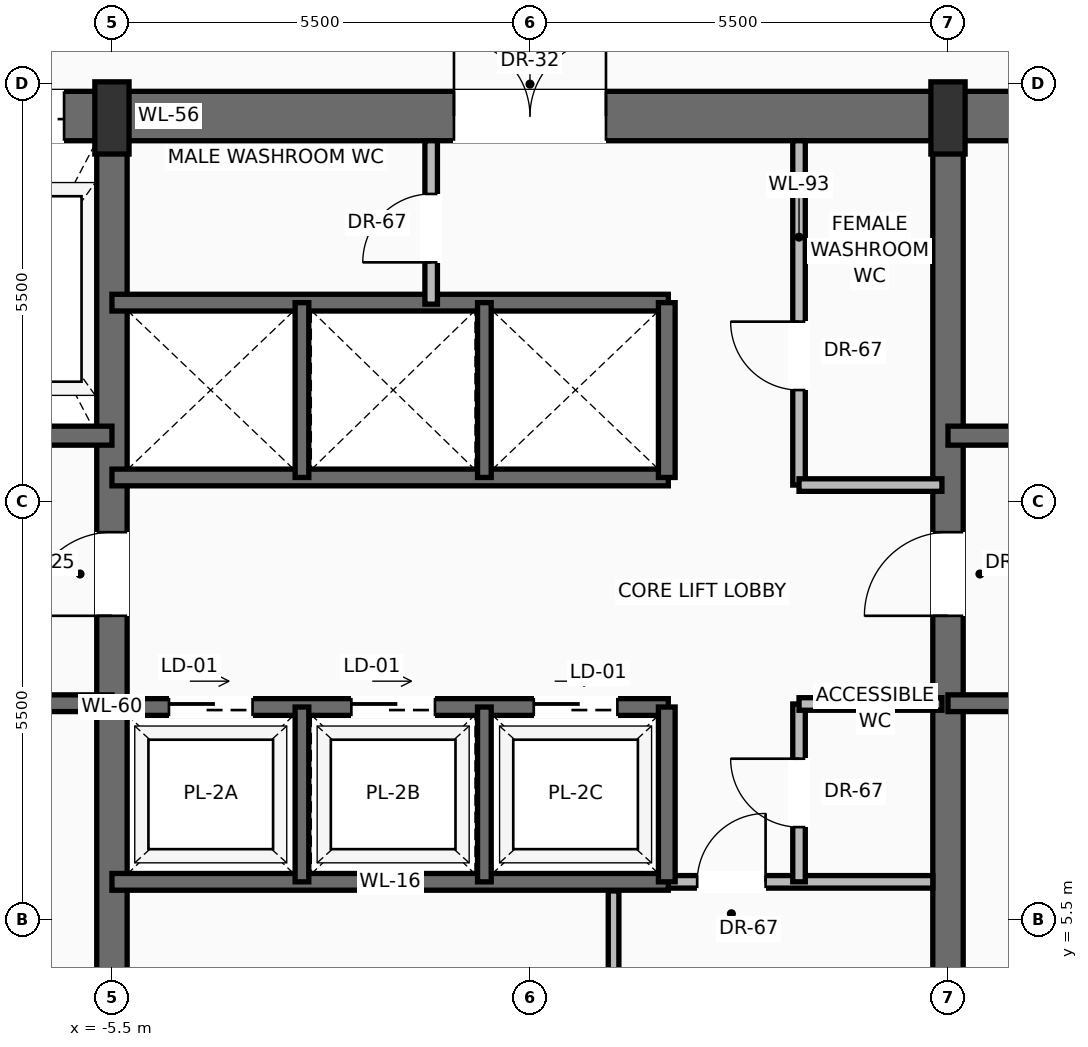
"""IFC4 building model, lengths in metres.
Left out: names, types, materials, properties, quantities, classifications, styles, units other than length and angle.
Written with IfcOpenShell. Run it as: python <this file> out.ifc"""

import sys

from ifc_helpers import new_model, si_unit, direction, frame, frame_2d, origin, origin_2d, place, context, subcontext, project, spatial, rectangle, extrude, source, transform, mapped, element, fill, save


model = new_model("IFC4")
c1 = context("Model", 3, precision=1e-05, world=origin(), true_north=direction((0.0, 1.0)))
c2 = subcontext(c1, "Body", "Model", "MODEL_VIEW")
j1 = project(units=[si_unit("LENGTHUNIT", "METRE"), si_unit("PLANEANGLEUNIT", "RADIAN")], contexts=[c1])
p1 = place(None, origin())
s1 = spatial("IfcSite", under=j1, at=p1, CompositionType="ELEMENT")
p2 = place(p1, origin())
s2 = spatial("IfcBuilding", under=s1, at=p2, CompositionType="ELEMENT")
p3 = place(p2, frame((0.0, 0.0, 147.8)))
s3 = spatial("IfcBuildingStorey", under=s2, at=p3, CompositionType="ELEMENT", Elevation=147.8)
p4 = place(p3, frame((-10.8, 16.075, 0.0), z_axis=(0.0, 0.0, 1.0), x_axis=(1.0, 0.0, 0.0)))
e1 = element("IfcWall", 1, at=p4, inside=s3, PredefinedType="SHEAR", context=c2, shape_type="SweptSolid", body=[
    extrude(rectangle(XDim=21.6, YDim=0.65, at=frame_2d((10.8, 0.0))), origin(), (0.0, 0.0, 1.0), 3.47),
])
p5 = place(p4, frame((3.37, 0.0, 0.0)))
e2 = element("IfcOpeningElement", 2, at=p5, cuts=e1, PredefinedType="OPENING", context=c2, shape_type="SweptSolid", body=[
    extrude(rectangle(XDim=1.3, YDim=2.3, at=frame_2d((0.65, 1.15))), frame((0.0, 0.335, 0.0), z_axis=(0.0, -1.0, 0.0), x_axis=(1.0, 0.0, 0.0)), (0.0, 0.0, 1.0), 0.67),
])
p6 = place(p4, frame((9.8, 0.0, 0.0)))
e3 = element("IfcOpeningElement", 3, at=p6, cuts=e1, PredefinedType="OPENING", context=c2, shape_type="SweptSolid", body=[
    extrude(rectangle(XDim=2.0, YDim=2.4, at=frame_2d((1.0, 1.2))), frame((0.0, 0.335, 0.0), z_axis=(0.0, -1.0, 0.0), x_axis=(1.0, 0.0, 0.0)), (0.0, 0.0, 1.0), 0.67),
])
p7 = place(p3, frame((-5.5, 0.525, 0.0), z_axis=(0.0, 0.0, 1.0), x_axis=(0.0, 1.0, 0.0)))
e4 = element("IfcWall", 4, at=p7, inside=s3, PredefinedType="SHEAR", context=c2, shape_type="SweptSolid", body=[
    extrude(rectangle(XDim=15.55, YDim=0.4, at=frame_2d((7.775, 0.0))), origin(), (0.0, 0.0, 1.0), 3.47),
])
p8 = place(p7, frame((8.975, 0.0, 0.0)))
e5 = element("IfcOpeningElement", 5, at=p8, cuts=e4, PredefinedType="OPENING", context=c2, shape_type="SweptSolid", body=[
    extrude(rectangle(XDim=1.1, YDim=2.2, at=frame_2d((0.55, 1.1))), frame((0.0, 0.21, 0.0), z_axis=(0.0, -1.0, 0.0), x_axis=(1.0, 0.0, 0.0)), (0.0, 0.0, 1.0), 0.42),
])
p9 = place(p3, frame((5.5, 0.525, 0.0), z_axis=(0.0, 0.0, 1.0), x_axis=(0.0, 1.0, 0.0)))
e6 = element("IfcWall", 6, at=p9, inside=s3, PredefinedType="SHEAR", context=c2, shape_type="SweptSolid", body=[
    extrude(rectangle(XDim=15.55, YDim=0.4, at=frame_2d((7.775, 0.0))), origin(), (0.0, 0.0, 1.0), 3.47),
])
p10 = place(p9, frame((8.975, 0.0, 0.0)))
e7 = element("IfcOpeningElement", 7, at=p10, cuts=e6, PredefinedType="OPENING", context=c2, shape_type="SweptSolid", body=[
    extrude(rectangle(XDim=1.1, YDim=2.2, at=frame_2d((0.55, 1.1))), frame((0.0, 0.21, 0.0), z_axis=(0.0, -1.0, 0.0), x_axis=(1.0, 0.0, 0.0)), (0.0, 0.0, 1.0), 0.42),
])
m1 = source(origin(), c2, "Body", "SweptSolid", [
    extrude(rectangle(XDim=0.45, YDim=0.95, at=origin_2d()), origin(), (0.0, 0.0, 1.0), 3.7),
])
for number, where, z_axis, x_axis in (
    (8, (-5.5, 16.05, 0.0), (0.0, 0.0, 1.0), (1.0, 0.0, 0.0)),
    (9, (5.5, 16.05, 0.0), (0.0, 0.0, 1.0), (1.0, 0.0, 0.0)),
):
    element("IfcColumn", number, at=place(p3, frame(where, z_axis=z_axis, x_axis=x_axis)), inside=s3, PredefinedType="PILASTER", context=c2, shape_type="MappedRepresentation", body=[
        mapped(m1, transform((0.0, 0.0, 0.0), scale=1.0)),
    ])
p11 = place(p3, frame((-5.5, 8.35, 0.0), z_axis=(0.0, 0.0, 1.0), x_axis=(-1.0, 0.0, 0.0)))
e10 = element("IfcWall", 10, at=p11, inside=s3, PredefinedType="SOLIDWALL", context=c2, shape_type="SweptSolid", body=[
    extrude(rectangle(XDim=4.65, YDim=0.22, at=frame_2d((2.325, 0.0))), origin(), (0.0, 0.0, 1.0), 3.47),
])
p12 = place(p11, frame((2.5, 0.0, 0.0)))
e11 = element("IfcOpeningElement", 11, at=p12, cuts=e10, PredefinedType="OPENING", context=c2, shape_type="SweptSolid", body=[
    extrude(rectangle(XDim=1.15, YDim=2.2, at=frame_2d((0.575, 1.1))), frame((0.0, 0.12, 0.0), z_axis=(0.0, -1.0, 0.0), x_axis=(1.0, 0.0, 0.0)), (0.0, 0.0, 1.0), 0.24),
])
p13 = place(p3, frame((-5.5, 11.87, 0.0), z_axis=(0.0, 0.0, 1.0), x_axis=(-1.0, 0.0, 0.0)))
e12 = element("IfcWall", 12, at=p13, inside=s3, PredefinedType="SOLIDWALL", context=c2, shape_type="SweptSolid", body=[
    extrude(rectangle(XDim=4.65, YDim=0.25, at=frame_2d((2.325, 0.0))), origin(), (0.0, 0.0, 1.0), 3.47),
])
p14 = place(p13, frame((2.95, 0.0, 0.0)))
e13 = element("IfcOpeningElement", 13, at=p14, cuts=e12, PredefinedType="OPENING", context=c2, shape_type="SweptSolid", body=[
    extrude(rectangle(XDim=1.2, YDim=2.25, at=frame_2d((0.6, 1.125))), frame((0.0, 0.135, 0.0), z_axis=(0.0, -1.0, 0.0), x_axis=(1.0, 0.0, 0.0)), (0.0, 0.0, 1.0), 0.27),
])
p15 = place(p3, frame((10.15, 8.35, 0.0), z_axis=(0.0, 0.0, 1.0), x_axis=(-1.0, 0.0, 0.0)))
e14 = element("IfcWall", 14, at=p15, inside=s3, PredefinedType="SOLIDWALL", context=c2, shape_type="SweptSolid", body=[
    extrude(rectangle(XDim=4.65, YDim=0.22, at=frame_2d((2.325, 0.0))), origin(), (0.0, 0.0, 1.0), 3.47),
])
p16 = place(p15, frame((1.0, 0.0, 0.0)))
e15 = element("IfcOpeningElement", 15, at=p16, cuts=e14, PredefinedType="OPENING", context=c2, shape_type="SweptSolid", body=[
    extrude(rectangle(XDim=1.15, YDim=2.2, at=frame_2d((0.575, 1.1))), frame((0.0, 0.12, 0.0), z_axis=(0.0, -1.0, 0.0), x_axis=(1.0, 0.0, 0.0)), (0.0, 0.0, 1.0), 0.24),
])
p17 = place(p3, frame((10.15, 11.87, 0.0), z_axis=(0.0, 0.0, 1.0), x_axis=(-1.0, 0.0, 0.0)))
e16 = element("IfcWall", 16, at=p17, inside=s3, PredefinedType="SOLIDWALL", context=c2, shape_type="SweptSolid", body=[
    extrude(rectangle(XDim=4.65, YDim=0.25, at=frame_2d((2.325, 0.0))), origin(), (0.0, 0.0, 1.0), 3.47),
])
p18 = place(p17, frame((0.5, 0.0, 0.0)))
e17 = element("IfcOpeningElement", 17, at=p18, cuts=e16, PredefinedType="OPENING", context=c2, shape_type="SweptSolid", body=[
    extrude(rectangle(XDim=1.2, YDim=2.25, at=frame_2d((0.6, 1.125))), frame((0.0, 0.135, 0.0), z_axis=(0.0, -1.0, 0.0), x_axis=(1.0, 0.0, 0.0)), (0.0, 0.0, 1.0), 0.27),
])
p19 = place(p3, frame((1.82, 6.0, 0.0), z_axis=(0.0, 0.0, 1.0), x_axis=(1.0, 0.0, 0.0)))
e18 = element("IfcWall", 18, at=p19, inside=s3, PredefinedType="PARTITIONING", context=c2, shape_type="SweptSolid", body=[
    extrude(rectangle(XDim=3.48, YDim=0.165, at=frame_2d((1.74, 0.0))), origin(), (0.0, 0.0, 1.0), 3.462),
])
p20 = place(p19, frame((0.38, 0.0, 0.0)))
e19 = element("IfcOpeningElement", 19, at=p20, cuts=e18, PredefinedType="OPENING", context=c2, shape_type="SweptSolid", body=[
    extrude(rectangle(XDim=0.9, YDim=2.1, at=frame_2d((0.45, 1.05))), frame((0.0, 0.093, 0.0), z_axis=(0.0, -1.0, 0.0), x_axis=(1.0, 0.0, 0.0)), (0.0, 0.0, 1.0), 0.185),
])
p21 = place(p3, frame((1.1, 0.85, 0.0), z_axis=(0.0, 0.0, 1.0), x_axis=(0.0, 1.0, 0.0)))
e20 = element("IfcWall", 20, at=p21, inside=s3, PredefinedType="PARTITIONING", context=c2, shape_type="SweptSolid", body=[
    extrude(rectangle(XDim=5.03, YDim=0.14, at=frame_2d((2.515, 0.0))), origin(), (0.0, 0.0, 1.0), 3.462),
])
p22 = place(p21, frame((2.1, 0.0, 0.0)))
e21 = element("IfcOpeningElement", 21, at=p22, cuts=e20, PredefinedType="OPENING", context=c2, shape_type="SweptSolid", body=[
    extrude(rectangle(XDim=0.9, YDim=2.1, at=frame_2d((0.45, 1.05))), frame((0.0, 0.08, 0.0), z_axis=(0.0, -1.0, 0.0), x_axis=(1.0, 0.0, 0.0)), (0.0, 0.0, 1.0), 0.16),
])
p23 = place(p3, frame((3.54, 6.0, 0.0), z_axis=(0.0, 0.0, 1.0), x_axis=(0.0, 1.0, 0.0)))
e22 = element("IfcWall", 22, at=p23, inside=s3, PredefinedType="PARTITIONING", context=c2, shape_type="SweptSolid", body=[
    extrude(rectangle(XDim=2.34, YDim=0.165, at=frame_2d((1.17, 0.0))), origin(), (0.0, 0.0, 1.0), 3.462),
])
p24 = place(p23, frame((0.72, 0.0, 0.0)))
e23 = element("IfcOpeningElement", 23, at=p24, cuts=e22, PredefinedType="OPENING", context=c2, shape_type="SweptSolid", body=[
    extrude(rectangle(XDim=0.9, YDim=2.1, at=frame_2d((0.45, 1.05))), frame((0.0, 0.093, 0.0), z_axis=(0.0, -1.0, 0.0), x_axis=(1.0, 0.0, 0.0)), (0.0, 0.0, 1.0), 0.185),
])
p25 = place(p3, frame((3.54, 8.34, 0.0), z_axis=(0.0, 0.0, 1.0), x_axis=(1.0, 0.0, 0.0)))
e24 = element("IfcWall", 24, at=p25, inside=s3, PredefinedType="PARTITIONING", context=c2, shape_type="SweptSolid", body=[
    extrude(rectangle(XDim=1.88, YDim=0.165, at=frame_2d((0.94, 0.0))), origin(), (0.0, 0.0, 1.0), 3.462),
])
p26 = place(p3, frame((-5.5, 6.0, 0.0), z_axis=(0.0, 0.0, 1.0), x_axis=(1.0, 0.0, 0.0)))
e25 = element("IfcWall", 25, at=p26, inside=s3, PredefinedType="SOLIDWALL", context=c2, shape_type="SweptSolid", body=[
    extrude(rectangle(XDim=7.32, YDim=0.22, at=frame_2d((3.66, 0.0))), origin(), (0.0, 0.0, 1.0), 3.47),
])
p27 = place(p3, frame((-5.5, 8.3, 0.0), z_axis=(0.0, 0.0, 1.0), x_axis=(1.0, 0.0, 0.0)))
e26 = element("IfcWall", 26, at=p27, inside=s3, PredefinedType="SOLIDWALL", context=c2, shape_type="SweptSolid", body=[
    extrude(rectangle(XDim=7.32, YDim=0.22, at=frame_2d((3.66, 0.0))), origin(), (0.0, 0.0, 1.0), 3.47),
])
p28 = place(p27, frame((0.75, 0.0, 0.0)))
e27 = element("IfcOpeningElement", 27, at=p28, cuts=e26, PredefinedType="OPENING", context=c2, shape_type="SweptSolid", body=[
    extrude(rectangle(XDim=1.1, YDim=2.2, at=frame_2d((0.55, 1.1))), frame((0.0, 0.12, 0.0), z_axis=(0.0, -1.0, 0.0), x_axis=(1.0, 0.0, 0.0)), (0.0, 0.0, 1.0), 0.24),
])
p29 = place(p27, frame((3.15, 0.0, 0.0)))
e28 = element("IfcOpeningElement", 28, at=p29, cuts=e26, PredefinedType="OPENING", context=c2, shape_type="SweptSolid", body=[
    extrude(rectangle(XDim=1.1, YDim=2.2, at=frame_2d((0.55, 1.1))), frame((0.0, 0.12, 0.0), z_axis=(0.0, -1.0, 0.0), x_axis=(1.0, 0.0, 0.0)), (0.0, 0.0, 1.0), 0.24),
])
p30 = place(p27, frame((5.55, 0.0, 0.0)))
e29 = element("IfcOpeningElement", 29, at=p30, cuts=e26, PredefinedType="OPENING", context=c2, shape_type="SweptSolid", body=[
    extrude(rectangle(XDim=1.1, YDim=2.2, at=frame_2d((0.55, 1.1))), frame((0.0, 0.12, 0.0), z_axis=(0.0, -1.0, 0.0), x_axis=(1.0, 0.0, 0.0)), (0.0, 0.0, 1.0), 0.24),
])
p31 = place(p3, frame((1.8, 6.0, 0.0), z_axis=(0.0, 0.0, 1.0), x_axis=(0.0, 1.0, 0.0)))
e30 = element("IfcWall", 30, at=p31, inside=s3, PredefinedType="SOLIDWALL", context=c2, shape_type="SweptSolid", body=[
    extrude(rectangle(XDim=2.3, YDim=0.22, at=frame_2d((1.15, 0.0))), origin(), (0.0, 0.0, 1.0), 3.47),
])
for number, where, z_axis, x_axis in (
    (31, (-3.0, 6.0, 0.0), (0.0, 0.0, 1.0), (0.0, 1.0, 0.0)),
    (32, (-0.6, 6.0, 0.0), (0.0, 0.0, 1.0), (0.0, 1.0, 0.0)),
):
    element("IfcWall", number, at=place(p3, frame(where, z_axis=z_axis, x_axis=x_axis)), inside=s3, PredefinedType="SOLIDWALL", context=c2, shape_type="SweptSolid", body=[
        extrude(rectangle(XDim=2.3, YDim=0.18, at=frame_2d((1.15, 0.0))), origin(), (0.0, 0.0, 1.0), 3.47),
    ])
for number, where, z_axis, x_axis in (
    (33, (-5.5, 11.32, 0.0), (0.0, 0.0, 1.0), (1.0, 0.0, 0.0)),
    (34, (-5.5, 13.62, 0.0), (0.0, 0.0, 1.0), (1.0, 0.0, 0.0)),
):
    element("IfcWall", number, at=place(p3, frame(where, z_axis=z_axis, x_axis=x_axis)), inside=s3, PredefinedType="SOLIDWALL", context=c2, shape_type="SweptSolid", body=[
        extrude(rectangle(XDim=7.32, YDim=0.22, at=frame_2d((3.66, 0.0))), origin(), (0.0, 0.0, 1.0), 3.47),
    ])
p32 = place(p3, frame((1.8, 11.32, 0.0), z_axis=(0.0, 0.0, 1.0), x_axis=(0.0, 1.0, 0.0)))
e35 = element("IfcWall", 35, at=p32, inside=s3, PredefinedType="SOLIDWALL", context=c2, shape_type="SweptSolid", body=[
    extrude(rectangle(XDim=2.3, YDim=0.22, at=frame_2d((1.15, 0.0))), origin(), (0.0, 0.0, 1.0), 3.47),
])
for number, where, z_axis, x_axis in (
    (36, (-3.0, 11.32, 0.0), (0.0, 0.0, 1.0), (0.0, 1.0, 0.0)),
    (37, (-0.6, 11.32, 0.0), (0.0, 0.0, 1.0), (0.0, 1.0, 0.0)),
):
    element("IfcWall", number, at=place(p3, frame(where, z_axis=z_axis, x_axis=x_axis)), inside=s3, PredefinedType="SOLIDWALL", context=c2, shape_type="SweptSolid", body=[
        extrude(rectangle(XDim=2.3, YDim=0.18, at=frame_2d((1.15, 0.0))), origin(), (0.0, 0.0, 1.0), 3.47),
    ])
p33 = place(p3, frame((-1.3, 13.6, 0.0), z_axis=(0.0, 0.0, 1.0), x_axis=(0.0, 1.0, 0.0)))
e38 = element("IfcWall", 38, at=p33, inside=s3, PredefinedType="PARTITIONING", context=c2, shape_type="SweptSolid", body=[
    extrude(rectangle(XDim=2.15, YDim=0.165, at=frame_2d((1.075, 0.0))), origin(), (0.0, 0.0, 1.0), 3.462),
])
p34 = place(p33, frame((0.55, 0.0, 0.0)))
e39 = element("IfcOpeningElement", 39, at=p34, cuts=e38, PredefinedType="OPENING", context=c2, shape_type="SweptSolid", body=[
    extrude(rectangle(XDim=0.9, YDim=2.1, at=frame_2d((0.45, 1.05))), frame((0.0, 0.093, 0.0), z_axis=(0.0, -1.0, 0.0), x_axis=(1.0, 0.0, 0.0)), (0.0, 0.0, 1.0), 0.185),
])
p35 = place(p3, frame((3.54, 11.22, 0.0), z_axis=(0.0, 0.0, 1.0), x_axis=(0.0, 1.0, 0.0)))
e40 = element("IfcWall", 40, at=p35, inside=s3, PredefinedType="PARTITIONING", context=c2, shape_type="SweptSolid", body=[
    extrude(rectangle(XDim=4.53, YDim=0.165, at=frame_2d((2.265, 0.0))), origin(), (0.0, 0.0, 1.0), 3.462),
])
p36 = place(p35, frame((1.25, 0.0, 0.0)))
e41 = element("IfcOpeningElement", 41, at=p36, cuts=e40, PredefinedType="OPENING", context=c2, shape_type="SweptSolid", body=[
    extrude(rectangle(XDim=0.9, YDim=2.1, at=frame_2d((0.45, 1.05))), frame((0.0, 0.093, 0.0), z_axis=(0.0, -1.0, 0.0), x_axis=(1.0, 0.0, 0.0)), (0.0, 0.0, 1.0), 0.185),
])
p37 = place(p3, frame((3.54, 11.22, 0.0), z_axis=(0.0, 0.0, 1.0), x_axis=(1.0, 0.0, 0.0)))
e42 = element("IfcWall", 42, at=p37, inside=s3, PredefinedType="PARTITIONING", context=c2, shape_type="SweptSolid", body=[
    extrude(rectangle(XDim=1.88, YDim=0.165, at=frame_2d((0.94, 0.0))), origin(), (0.0, 0.0, 1.0), 3.462),
])
m2 = source(origin(), c2, "Body", "SweptSolid", [
    extrude(rectangle(XDim=1.1, YDim=2.2, at=frame_2d((0.55, 1.1))), frame((0.0, 0.025, 0.0), z_axis=(0.0, -1.0, 0.0), x_axis=(1.0, 0.0, 0.0)), (0.0, 0.0, 1.0), 0.05),
])
p38 = place(p8, origin())
e43 = element("IfcDoor", 43, at=p38, inside=s3, OperationType="SINGLE_SWING_LEFT", PredefinedType="DOOR", context=c2, shape_type="MappedRepresentation", body=[
    mapped(m2, transform((0.0, 0.0, 0.0), scale=1.0)),
])
fill(e5, e43)
m3 = source(origin(), c2, "Body", "SweptSolid", [
    extrude(rectangle(XDim=1.3, YDim=2.3, at=frame_2d((0.65, 1.15))), frame((0.0, 0.025, 0.0), z_axis=(0.0, -1.0, 0.0), x_axis=(1.0, 0.0, 0.0)), (0.0, 0.0, 1.0), 0.05),
])
p39 = place(p5, origin())
e44 = element("IfcDoor", 44, at=p39, inside=s3, OperationType="SLIDING_TO_RIGHT", PredefinedType="DOOR", context=c2, shape_type="MappedRepresentation", body=[
    mapped(m3, transform((0.0, 0.0, 0.0), scale=1.0)),
])
fill(e2, e44)
p40 = place(p10, origin())
e45 = element("IfcDoor", 45, at=p40, inside=s3, OperationType="SINGLE_SWING_LEFT", PredefinedType="DOOR", context=c2, shape_type="MappedRepresentation", body=[
    mapped(m2, transform((0.0, 0.0, 0.0), scale=1.0)),
])
fill(e7, e45)
m4 = source(origin(), c2, "Body", "SweptSolid", [
    extrude(rectangle(XDim=2.0, YDim=2.4, at=frame_2d((1.0, 1.2))), frame((0.0, 0.025, 0.0), z_axis=(0.0, -1.0, 0.0), x_axis=(1.0, 0.0, 0.0)), (0.0, 0.0, 1.0), 0.05),
])
p41 = place(p6, origin())
e46 = element("IfcDoor", 46, at=p41, inside=s3, OperationType="DOUBLE_DOOR_SINGLE_SWING", PredefinedType="DOOR", context=c2, shape_type="MappedRepresentation", body=[
    mapped(m4, transform((0.0, 0.0, 0.0), scale=1.0)),
])
fill(e3, e46)
m5 = source(origin(), c2, "Body", "SweptSolid", [
    extrude(rectangle(XDim=0.9, YDim=2.1, at=frame_2d((0.45, 1.05))), frame((0.0, 0.025, 0.0), z_axis=(0.0, -1.0, 0.0), x_axis=(1.0, 0.0, 0.0)), (0.0, 0.0, 1.0), 0.05),
])
p42 = place(p20, origin())
e47 = element("IfcDoor", 47, at=p42, inside=s3, OperationType="SINGLE_SWING_RIGHT", PredefinedType="DOOR", context=c2, shape_type="MappedRepresentation", body=[
    mapped(m5, transform((0.0, 0.0, 0.0), scale=1.0)),
])
fill(e19, e47)
p43 = place(p24, origin())
e48 = element("IfcDoor", 48, at=p43, inside=s3, OperationType="SINGLE_SWING_RIGHT", PredefinedType="DOOR", context=c2, shape_type="MappedRepresentation", body=[
    mapped(m5, transform((0.0, 0.0, 0.0), scale=1.0)),
])
fill(e23, e48)
m6 = source(origin(), c2, "Body", "SweptSolid", [
    extrude(rectangle(XDim=1.1, YDim=2.2, at=frame_2d((0.55, 1.1))), frame((0.0, 0.025, 0.0), z_axis=(0.0, -1.0, 0.0), x_axis=(1.0, 0.0, 0.0)), (0.0, 0.0, 1.0), 0.05),
])
p44 = place(p28, origin())
e49 = element("IfcDoor", 49, at=p44, inside=s3, OperationType="SLIDING_TO_LEFT", PredefinedType="DOOR", context=c2, shape_type="MappedRepresentation", body=[
    mapped(m6, transform((0.0, 0.0, 0.0), scale=1.0)),
])
fill(e27, e49)
p45 = place(p29, origin())
e50 = element("IfcDoor", 50, at=p45, inside=s3, OperationType="SLIDING_TO_LEFT", PredefinedType="DOOR", context=c2, shape_type="MappedRepresentation", body=[
    mapped(m6, transform((0.0, 0.0, 0.0), scale=1.0)),
])
fill(e28, e50)
p46 = place(p30, origin())
e51 = element("IfcDoor", 51, at=p46, inside=s3, OperationType="SLIDING_TO_LEFT", PredefinedType="DOOR", context=c2, shape_type="MappedRepresentation", body=[
    mapped(m6, transform((0.0, 0.0, 0.0), scale=1.0)),
])
fill(e29, e51)
p47 = place(p34, origin())
e52 = element("IfcDoor", 52, at=p47, inside=s3, OperationType="SINGLE_SWING_LEFT", PredefinedType="DOOR", context=c2, shape_type="MappedRepresentation", body=[
    mapped(m5, transform((0.0, 0.0, 0.0), scale=1.0)),
])
fill(e39, e52)
p48 = place(p36, origin())
e53 = element("IfcDoor", 53, at=p48, inside=s3, OperationType="SINGLE_SWING_RIGHT", PredefinedType="DOOR", context=c2, shape_type="MappedRepresentation", body=[
    mapped(m5, transform((0.0, 0.0, 0.0), scale=1.0)),
])
fill(e41, e53)
save(model, sys.argv[1])
